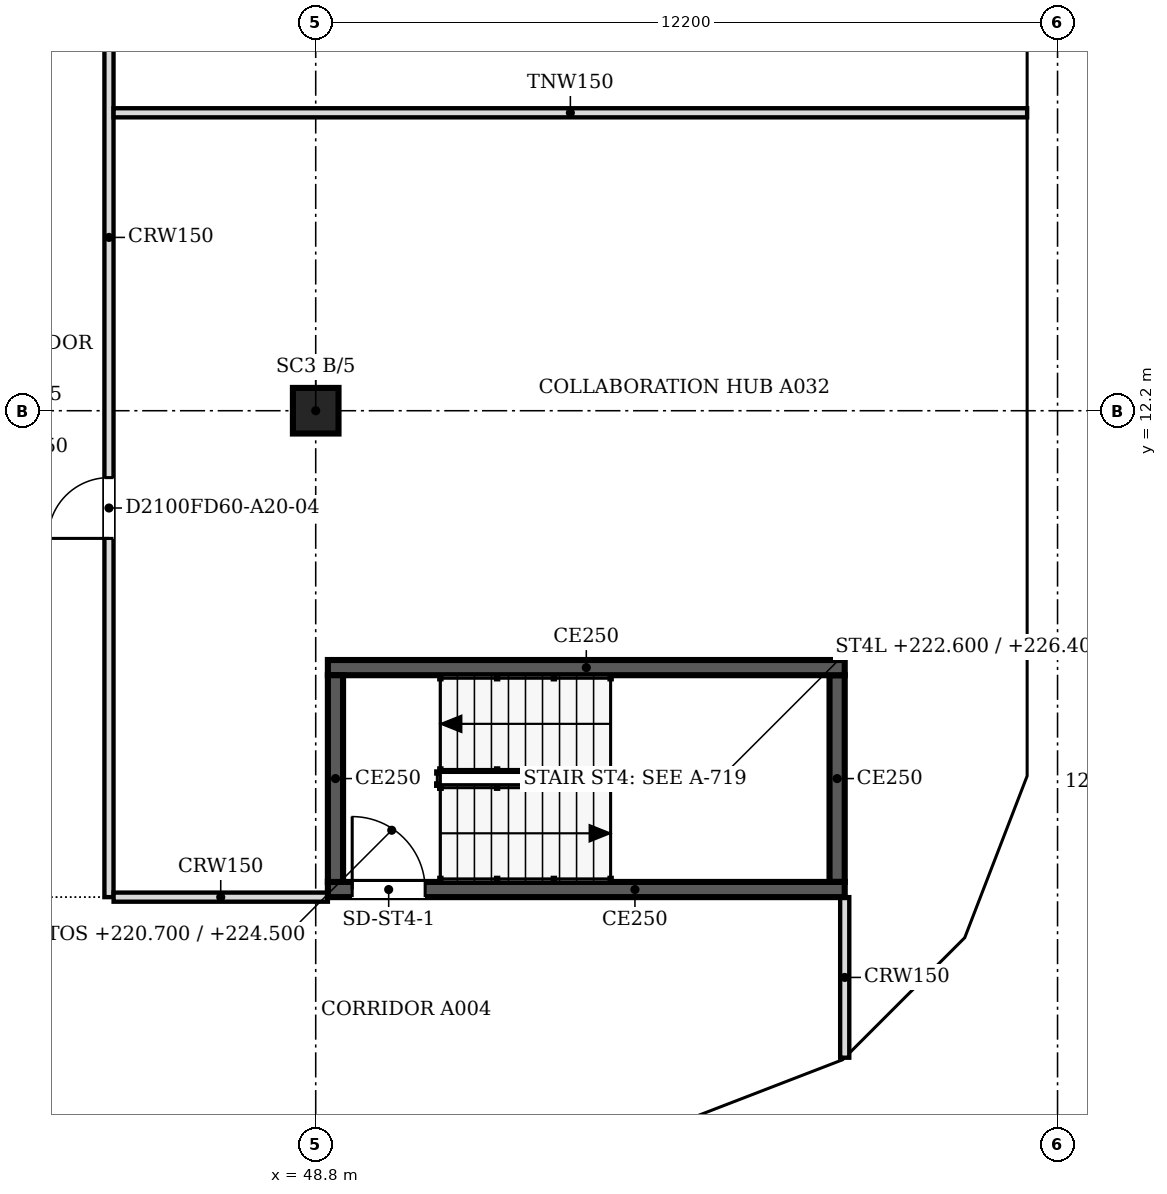
"""IFC4 building model, lengths in metres.
Left out: names, types, materials, properties, quantities, classifications, styles, units other than length and angle.
Written with IfcOpenShell. Run it as: python <this file> out.ifc"""

import sys

from ifc_helpers import new_model, si_unit, direction, frame, frame_2d, origin, origin_2d, place, context, subcontext, project, spatial, polyline, rectangle, outline, extrude, faceted_brep, source, transform, mapped, element, fill, save


model = new_model("IFC4")
c1 = context("Model", 3, precision=1e-05, world=origin(), true_north=direction((0.0, 1.0)))
c2 = subcontext(c1, "Body", "Model", "MODEL_VIEW")
j1 = project(units=[si_unit("LENGTHUNIT", "METRE"), si_unit("PLANEANGLEUNIT", "RADIAN")], contexts=[c1])
p1 = place(None, origin())
s1 = spatial("IfcSite", under=j1, at=p1, CompositionType="ELEMENT")
p2 = place(p1, origin())
s2 = spatial("IfcBuilding", under=s1, at=p2, CompositionType="ELEMENT")
p3 = place(p2, frame((0.0, 0.0, 220.7)))
s3 = spatial("IfcBuildingStorey", under=s2, at=p3, CompositionType="ELEMENT", Elevation=220.7)
p4 = place(p3, frame((48.8, 12.2, 0.0), z_axis=(0.0, 0.0, 1.0), x_axis=(1.0, 0.0, 0.0)))
e1 = element("IfcColumn", 1, at=p4, inside=s3, PredefinedType="COLUMN", context=c2, shape_type="SweptSolid", body=[
    extrude(rectangle(XDim=0.75, YDim=0.75, at=origin_2d()), origin(), (0.0, 0.0, 1.0), 3.6),
])
m1 = source(origin(), c2, "Body", "Brep", [
    faceted_brep([(0.047, -0.25, 0.0), (2.997, -0.25, 3.8), (0.047, -0.25, 7.6), (0.0, -0.25, 7.541), (0.0, -0.25, 0.059), (0.093, 0.25, 7.54), (2.944, 0.25, 3.868), (2.944, 0.25, 3.732), (0.093, 0.25, 0.06), (2.997, 0.0, 3.8), (0.047, 0.0, 0.0), (0.047, 0.0, 7.6)], [[[0, 1, 2, 3, 4]], [[5, 6, 7, 8]], [[8, 7, 9, 1, 0, 10]], [[6, 5, 11, 2, 1, 9]], [[3, 2, 11]], [[10, 0, 4]], [[8, 10, 4, 3, 11, 5]], [[9, 7, 6]]]),
])
p5 = place(p3, frame((54.81, 0.233, -3.8), z_axis=(0.0, 0.0, 1.0), x_axis=(0.932990326376, 0.359901446078, 0.0)))
e2 = element("IfcWall", 2, at=p5, inside=s3, PredefinedType="SOLIDWALL", context=c2, shape_type="MappedRepresentation", body=[
    mapped(m1, transform((0.0, 0.0, 0.0), scale=1.0)),
])
m2 = source(origin(), c2, "Body", "SweptSolid", [
    extrude(outline(polyline([(0.247, 0.665), (2.681, 3.8), (0.247, 6.935), (0.247, 0.665)])), frame((0.0, 0.26, 0.0), z_axis=(0.0, -1.0, 0.0), x_axis=(1.0, 0.0, 0.0)), (0.0, 0.0, 1.0), 0.52),
])
p6 = place(p5, origin())
e3 = element("IfcOpeningElement", 3, at=p6, cuts=e2, PredefinedType="OPENING", context=c2, shape_type="MappedRepresentation", body=[
    mapped(m2, transform((0.0, 0.0, 0.0), scale=1.0)),
])
m3 = source(origin(), c2, "Body", "Brep", [
    faceted_brep([(2.944, -0.25, 0.0), (2.997, -0.25, 0.068), (2.997, -0.25, 7.532), (2.944, -0.25, 7.6), (0.0, -0.25, 3.8), (0.053, 0.25, 3.868), (2.891, 0.25, 7.532), (2.891, 0.25, 0.068), (0.053, 0.25, 3.732), (2.944, 0.0, 0.0), (2.944, 0.0, 7.6), (0.0, 0.0, 3.8)], [[[0, 1, 2, 3, 4]], [[5, 6, 7, 8]], [[1, 0, 9]], [[10, 3, 2]], [[6, 5, 11, 4, 3, 10]], [[8, 7, 9, 0, 4, 11]], [[8, 11, 5]], [[1, 9, 7, 6, 10, 2]]]),
])
p7 = place(p3, frame((57.606, 1.312, -3.8), z_axis=(0.0, 0.0, 1.0), x_axis=(0.707147509625, 0.707066050402, 0.0)))
e4 = element("IfcWall", 4, at=p7, inside=s3, PredefinedType="SOLIDWALL", context=c2, shape_type="MappedRepresentation", body=[
    mapped(m3, transform((0.0, 0.0, 0.0), scale=1.0)),
])
m4 = source(origin(), c2, "Body", "SweptSolid", [
    extrude(outline(polyline([(2.744, 6.934), (0.316, 3.8), (2.744, 0.667), (2.744, 6.934)])), frame((0.0, 0.26, 0.0), z_axis=(0.0, -1.0, 0.0), x_axis=(1.0, 0.0, 0.0)), (0.0, 0.0, 1.0), 0.52),
])
p8 = place(p7, origin())
e5 = element("IfcOpeningElement", 5, at=p8, cuts=e4, PredefinedType="OPENING", context=c2, shape_type="MappedRepresentation", body=[
    mapped(m4, transform((0.0, 0.0, 0.0), scale=1.0)),
])
m5 = source(origin(), c2, "Body", "Brep", [
    faceted_brep([(0.053, -0.25, 0.0), (3.003, -0.25, 3.8), (0.053, -0.25, 7.6), (0.0, -0.25, 7.532), (0.0, -0.25, 0.068), (0.106, 0.25, 7.532), (2.957, 0.25, 3.86), (2.957, 0.25, 3.74), (0.106, 0.25, 0.068), (3.003, 0.0, 3.8), (0.053, 0.0, 0.0), (0.053, 0.0, 7.6)], [[[0, 1, 2, 3, 4]], [[5, 6, 7, 8]], [[8, 7, 9, 1, 0, 10]], [[6, 5, 11, 2, 1, 9]], [[3, 2, 11]], [[10, 0, 4]], [[8, 10, 4, 3, 11, 5]], [[9, 7, 6]]]),
])
p9 = place(p3, frame((59.669, 3.344, -3.8), z_axis=(0.0, 0.0, 1.0), x_axis=(0.35992665181, 0.932980602862, 0.0)))
e6 = element("IfcWall", 6, at=p9, inside=s3, PredefinedType="SOLIDWALL", context=c2, shape_type="MappedRepresentation", body=[
    mapped(m5, transform((0.0, 0.0, 0.0), scale=1.0)),
])
m6 = source(origin(), c2, "Body", "SweptSolid", [
    extrude(outline(polyline([(0.253, 0.665), (2.687, 3.8), (0.253, 6.935), (0.253, 0.665)])), frame((0.0, 0.26, 0.0), z_axis=(0.0, -1.0, 0.0), x_axis=(1.0, 0.0, 0.0)), (0.0, 0.0, 1.0), 0.52),
])
p10 = place(p9, origin())
e7 = element("IfcOpeningElement", 7, at=p10, cuts=e6, PredefinedType="OPENING", context=c2, shape_type="MappedRepresentation", body=[
    mapped(m6, transform((0.0, 0.0, 0.0), scale=1.0)),
])
m7 = source(origin(), c2, "Body", "Brep", [
    faceted_brep([(3.003, -0.25, 0.0), (6.053, -0.25, 3.8), (3.003, -0.25, 7.6), (0.0, -0.25, 3.8), (0.047, 0.25, 3.859), (3.003, 0.25, 7.6), (6.053, 0.25, 3.8), (3.003, 0.25, 0.0), (0.047, 0.25, 3.741), (0.0, 0.0, 3.8)], [[[0, 1, 2, 3]], [[4, 5, 6, 7, 8]], [[7, 6, 1, 0]], [[6, 5, 2, 1]], [[5, 4, 9, 3, 2]], [[8, 7, 0, 3, 9]], [[8, 9, 4]]]),
])
p11 = place(p3, frame((60.75, 6.146, -3.8), z_axis=(0.0, 0.0, 1.0), x_axis=(0.0, 1.0, 0.0)))
e8 = element("IfcWall", 8, at=p11, inside=s3, PredefinedType="SOLIDWALL", context=c2, shape_type="MappedRepresentation", body=[
    mapped(m7, transform((0.0, 0.0, 0.0), scale=1.0)),
])
m8 = source(origin(), c2, "Body", "SweptSolid", [
    extrude(outline(polyline([(3.005, 0.401), (5.733, 3.8), (3.005, 7.199), (0.319, 3.8), (3.005, 0.401)])), frame((0.0, 0.26, 0.0), z_axis=(0.0, -1.0, 0.0), x_axis=(1.0, 0.0, 0.0)), (0.0, 0.0, 1.0), 0.52),
])
p12 = place(p11, origin())
e9 = element("IfcOpeningElement", 9, at=p12, cuts=e8, PredefinedType="OPENING", context=c2, shape_type="MappedRepresentation", body=[
    mapped(m8, transform((0.0, 0.0, 0.0), scale=1.0)),
])
m9 = source(origin(), c2, "Body", "SweptSolid", [
    extrude(outline(polyline([(3.05, 0.0), (6.1, 3.8), (3.05, 7.6), (0.0, 3.8), (3.05, 0.0)])), frame((0.0, 0.25, 0.0), z_axis=(0.0, -1.0, 0.0), x_axis=(1.0, 0.0, 0.0)), (0.0, 0.0, 1.0), 0.5),
])
p13 = place(p3, frame((60.75, 12.2, -3.8), z_axis=(0.0, 0.0, 1.0), x_axis=(0.0, 1.0, 0.0)))
e10 = element("IfcWall", 10, at=p13, inside=s3, PredefinedType="SOLIDWALL", context=c2, shape_type="MappedRepresentation", body=[
    mapped(m9, transform((0.0, 0.0, 0.0), scale=1.0)),
])
m10 = source(origin(), c2, "Body", "SweptSolid", [
    extrude(outline(polyline([(3.05, 0.399), (5.78, 3.8), (3.05, 7.201), (0.321, 3.8), (3.05, 0.399)])), frame((0.0, 0.26, 0.0), z_axis=(0.0, -1.0, 0.0), x_axis=(1.0, 0.0, 0.0)), (0.0, 0.0, 1.0), 0.52),
])
p14 = place(p13, origin())
e11 = element("IfcOpeningElement", 11, at=p14, cuts=e10, PredefinedType="OPENING", context=c2, shape_type="MappedRepresentation", body=[
    mapped(m10, transform((0.0, 0.0, 0.0), scale=1.0)),
])
p15 = place(p2, frame((0.0, 0.0, 224.5)))
s4 = spatial("IfcBuildingStorey", under=s2, at=p15, CompositionType="ELEMENT", Elevation=224.5)
m11 = source(origin(), c2, "Body", "Brep", [
    faceted_brep([(2.95, -0.25, 0.0), (3.003, -0.25, 0.068), (3.003, -0.25, 7.532), (2.95, -0.25, 7.6), (0.0, -0.25, 3.8), (0.047, 0.25, 3.86), (2.898, 0.25, 7.532), (2.898, 0.25, 0.068), (0.047, 0.25, 3.74), (2.95, 0.0, 0.0), (2.95, 0.0, 7.6), (0.0, 0.0, 3.8)], [[[0, 1, 2, 3, 4]], [[5, 6, 7, 8]], [[1, 0, 9]], [[10, 3, 2]], [[6, 5, 11, 4, 3, 10]], [[8, 7, 9, 0, 4, 11]], [[8, 11, 5]], [[1, 9, 7, 6, 10, 2]]]),
])
p16 = place(p15, frame((54.854, 0.25, -3.8), z_axis=(0.0, 0.0, 1.0), x_axis=(0.932970071518, 0.359953949349, 0.0)))
e12 = element("IfcWall", 12, at=p16, inside=s4, PredefinedType="SOLIDWALL", context=c2, shape_type="MappedRepresentation", body=[
    mapped(m11, transform((0.0, 0.0, 0.0), scale=1.0)),
])
m12 = source(origin(), c2, "Body", "SweptSolid", [
    extrude(outline(polyline([(2.75, 6.935), (0.316, 3.8), (2.75, 0.665), (2.75, 6.935)])), frame((0.0, 0.26, 0.0), z_axis=(0.0, -1.0, 0.0), x_axis=(1.0, 0.0, 0.0)), (0.0, 0.0, 1.0), 0.52),
])
p17 = place(p16, origin())
e13 = element("IfcOpeningElement", 13, at=p17, cuts=e12, PredefinedType="OPENING", context=c2, shape_type="MappedRepresentation", body=[
    mapped(m12, transform((0.0, 0.0, 0.0), scale=1.0)),
])
m13 = source(origin(), c2, "Body", "Brep", [
    faceted_brep([(0.053, -0.25, 0.0), (2.997, -0.25, 3.8), (0.053, -0.25, 7.6), (0.0, -0.25, 7.532), (0.0, -0.25, 0.068), (0.106, 0.25, 7.532), (2.944, 0.25, 3.868), (2.944, 0.25, 3.732), (0.106, 0.25, 0.068), (2.997, 0.0, 3.8), (0.053, 0.0, 0.0), (0.053, 0.0, 7.6)], [[[0, 1, 2, 3, 4]], [[5, 6, 7, 8]], [[8, 7, 9, 1, 0, 10]], [[6, 5, 11, 2, 1, 9]], [[3, 2, 11]], [[10, 0, 4]], [[8, 10, 4, 3, 11, 5]], [[9, 7, 6]]]),
])
p18 = place(p15, frame((57.569, 1.274, -3.8), z_axis=(0.0, 0.0, 1.0), x_axis=(0.707066050402, 0.707147509625, 0.0)))
e14 = element("IfcWall", 14, at=p18, inside=s4, PredefinedType="SOLIDWALL", context=c2, shape_type="MappedRepresentation", body=[
    mapped(m13, transform((0.0, 0.0, 0.0), scale=1.0)),
])
m14 = source(origin(), c2, "Body", "SweptSolid", [
    extrude(outline(polyline([(0.253, 0.666), (2.681, 3.8), (0.253, 6.934), (0.253, 0.666)])), frame((0.0, 0.26, 0.0), z_axis=(0.0, -1.0, 0.0), x_axis=(1.0, 0.0, 0.0)), (0.0, 0.0, 1.0), 0.52),
])
p19 = place(p18, origin())
e15 = element("IfcOpeningElement", 15, at=p19, cuts=e14, PredefinedType="OPENING", context=c2, shape_type="MappedRepresentation", body=[
    mapped(m14, transform((0.0, 0.0, 0.0), scale=1.0)),
])
m15 = source(origin(), c2, "Body", "Brep", [
    faceted_brep([(2.95, -0.25, 0.0), (2.997, -0.25, 0.059), (2.997, -0.25, 7.541), (2.95, -0.25, 7.6), (0.0, -0.25, 3.8), (0.053, 0.25, 3.868), (2.904, 0.25, 7.54), (2.904, 0.25, 0.06), (0.053, 0.25, 3.732), (2.95, 0.0, 0.0), (2.95, 0.0, 7.6), (0.0, 0.0, 3.8)], [[[0, 1, 2, 3, 4]], [[5, 6, 7, 8]], [[1, 0, 9]], [[10, 3, 2]], [[6, 5, 11, 4, 3, 10]], [[8, 7, 9, 0, 4, 11]], [[8, 11, 5]], [[1, 9, 7, 6, 10, 2]]]),
])
p20 = place(p15, frame((59.688, 3.394, -3.8), z_axis=(0.0, 0.0, 1.0), x_axis=(0.359972353723, 0.932962970624, 0.0)))
e16 = element("IfcWall", 16, at=p20, inside=s4, PredefinedType="SOLIDWALL", context=c2, shape_type="MappedRepresentation", body=[
    mapped(m15, transform((0.0, 0.0, 0.0), scale=1.0)),
])
p21 = place(p20, origin())
e17 = element("IfcOpeningElement", 17, at=p21, cuts=e16, PredefinedType="OPENING", context=c2, shape_type="MappedRepresentation", body=[
    mapped(m12, transform((0.0, 0.0, 0.0), scale=1.0)),
])
m16 = source(origin(), c2, "Body", "Brep", [
    faceted_brep([(0.047, -0.25, 0.0), (3.05, -0.25, 3.8), (0.047, -0.25, 7.6), (0.0, -0.25, 7.54), (0.0, -0.25, 0.06), (0.093, 0.25, 7.541), (3.05, 0.25, 3.8), (0.093, 0.25, 0.059), (0.047, 0.0, 0.0), (0.047, 0.0, 7.6)], [[[0, 1, 2, 3, 4]], [[5, 6, 7]], [[7, 6, 1, 0, 8]], [[6, 5, 9, 2, 1]], [[3, 2, 9]], [[8, 0, 4]], [[7, 8, 4, 3, 9, 5]]]),
])
p22 = place(p15, frame((60.75, 6.1, -3.8), z_axis=(0.0, 0.0, 1.0), x_axis=(0.0, 1.0, 0.0)))
e18 = element("IfcWall", 18, at=p22, inside=s4, PredefinedType="SOLIDWALL", context=c2, shape_type="MappedRepresentation", body=[
    mapped(m16, transform((0.0, 0.0, 0.0), scale=1.0)),
])
m17 = source(origin(), c2, "Body", "SweptSolid", [
    extrude(outline(polyline([(0.247, 0.656), (2.731, 3.8), (0.247, 6.944), (0.247, 0.656)])), frame((0.0, 0.26, 0.0), z_axis=(0.0, -1.0, 0.0), x_axis=(1.0, 0.0, 0.0)), (0.0, 0.0, 1.0), 0.52),
])
p23 = place(p22, origin())
e19 = element("IfcOpeningElement", 19, at=p23, cuts=e18, PredefinedType="OPENING", context=c2, shape_type="MappedRepresentation", body=[
    mapped(m17, transform((0.0, 0.0, 0.0), scale=1.0)),
])
p24 = place(p15, frame((60.75, 9.15, -3.8), z_axis=(0.0, 0.0, 1.0), x_axis=(0.0, 1.0, 0.0)))
e20 = element("IfcWall", 20, at=p24, inside=s4, PredefinedType="SOLIDWALL", context=c2, shape_type="MappedRepresentation", body=[
    mapped(m9, transform((0.0, 0.0, 0.0), scale=1.0)),
])
p25 = place(p24, origin())
e21 = element("IfcOpeningElement", 21, at=p25, cuts=e20, PredefinedType="OPENING", context=c2, shape_type="MappedRepresentation", body=[
    mapped(m10, transform((0.0, 0.0, 0.0), scale=1.0)),
])
p26 = place(p15, frame((60.75, 15.25, -3.8), z_axis=(0.0, 0.0, 1.0), x_axis=(0.0, 1.0, 0.0)))
e22 = element("IfcWall", 22, at=p26, inside=s4, PredefinedType="SOLIDWALL", context=c2, shape_type="MappedRepresentation", body=[
    mapped(m9, transform((0.0, 0.0, 0.0), scale=1.0)),
])
p27 = place(p26, origin())
e23 = element("IfcOpeningElement", 23, at=p27, cuts=e22, PredefinedType="OPENING", context=c2, shape_type="MappedRepresentation", body=[
    mapped(m10, transform((0.0, 0.0, 0.0), scale=1.0)),
])
p28 = place(p3, frame((57.5, 4.325, 0.0), z_axis=(0.0, 0.0, 1.0), x_axis=(-1.0, 0.0, 0.0)))
e24 = element("IfcWall", 24, at=p28, inside=s3, PredefinedType="SOLIDWALL", context=c2, shape_type="SweptSolid", body=[
    extrude(rectangle(XDim=8.5, YDim=0.25, at=frame_2d((4.25, 0.0))), origin(), (0.0, 0.0, 1.0), 3.8),
])
m18 = source(origin(), c2, "Body", "SweptSolid", [
    extrude(rectangle(XDim=1.2, YDim=2.1, at=frame_2d((0.6, 1.05))), frame((0.0, 0.135, 0.0), z_axis=(0.0, -1.0, 0.0), x_axis=(1.0, 0.0, 0.0)), (0.0, 0.0, 1.0), 0.27),
])
p29 = place(p28, frame((6.9, 0.0, 0.0)))
e25 = element("IfcOpeningElement", 25, at=p29, cuts=e24, PredefinedType="OPENING", context=c2, shape_type="MappedRepresentation", body=[
    mapped(m18, transform((0.0, 0.0, 0.0), scale=1.0)),
])
p30 = place(p3, frame((49.125, 4.45, 0.0), z_axis=(0.0, 0.0, 1.0), x_axis=(0.0, 1.0, 0.0)))
e26 = element("IfcWall", 26, at=p30, inside=s3, PredefinedType="SOLIDWALL", context=c2, shape_type="SweptSolid", body=[
    extrude(rectangle(XDim=3.4, YDim=0.25, at=frame_2d((1.7, 0.0))), origin(), (0.0, 0.0, 1.0), 3.8),
])
p31 = place(p3, frame((49.0, 7.975, 0.0), z_axis=(0.0, 0.0, 1.0), x_axis=(1.0, 0.0, 0.0)))
e27 = element("IfcWall", 27, at=p31, inside=s3, PredefinedType="SOLIDWALL", context=c2, shape_type="SweptSolid", body=[
    extrude(rectangle(XDim=8.5, YDim=0.25, at=frame_2d((4.25, 0.0))), origin(), (0.0, 0.0, 1.0), 3.8),
])
p32 = place(p3, frame((57.375, 7.85, 0.0), z_axis=(0.0, 0.0, 1.0), x_axis=(0.0, -1.0, 0.0)))
e28 = element("IfcWall", 28, at=p32, inside=s3, PredefinedType="SOLIDWALL", context=c2, shape_type="SweptSolid", body=[
    extrude(rectangle(XDim=3.4, YDim=0.25, at=frame_2d((1.7, 0.0))), origin(), (0.0, 0.0, 1.0), 3.8),
])
p33 = place(p3, frame((57.5, 1.559, 0.0), z_axis=(0.0, 0.0, 1.0), x_axis=(0.0, 1.0, 0.0)))
e29 = element("IfcWall", 29, at=p33, inside=s3, PredefinedType="PARTITIONING", context=c2, shape_type="SweptSolid", body=[
    extrude(rectangle(XDim=2.641, YDim=0.15, at=frame_2d((1.32, 0.0))), origin(), (0.0, 0.0, 1.0), 3.067),
])
p34 = place(p3, frame((45.4, 21.924, 0.0), z_axis=(0.0, 0.0, 1.0), x_axis=(0.0, -1.0, 0.0)))
e30 = element("IfcWall", 30, at=p34, inside=s3, PredefinedType="PARTITIONING", context=c2, shape_type="SweptSolid", body=[
    extrude(rectangle(XDim=17.724, YDim=0.15, at=frame_2d((8.862, 0.0))), origin(), (0.0, 0.0, 1.0), 3.067),
])
m19 = source(origin(), c2, "Body", "SweptSolid", [
    extrude(rectangle(XDim=1.0, YDim=2.1, at=frame_2d((0.5, 1.05))), frame((0.0, 0.085, 0.0), z_axis=(0.0, -1.0, 0.0), x_axis=(1.0, 0.0, 0.0)), (0.0, 0.0, 1.0), 0.17),
])
p35 = place(p34, frame((1.923, 0.0, 0.0)))
e31 = element("IfcOpeningElement", 31, at=p35, cuts=e30, PredefinedType="OPENING", context=c2, shape_type="MappedRepresentation", body=[
    mapped(m19, transform((0.0, 0.0, 0.0), scale=1.0)),
])
p36 = place(p34, frame((10.824, 0.0, 0.0)))
e32 = element("IfcOpeningElement", 32, at=p36, cuts=e30, PredefinedType="OPENING", context=c2, shape_type="MappedRepresentation", body=[
    mapped(m19, transform((0.0, 0.0, 0.0), scale=1.0)),
])
p37 = place(p3, frame((45.476, 4.2, 0.0), z_axis=(0.0, 0.0, 1.0), x_axis=(1.0, 0.0, 0.0)))
e33 = element("IfcWall", 33, at=p37, inside=s3, PredefinedType="PARTITIONING", context=c2, shape_type="SweptSolid", body=[
    extrude(rectangle(XDim=3.524, YDim=0.15, at=frame_2d((1.762, 0.0))), origin(), (0.0, 0.0, 1.0), 3.067),
])
p38 = place(p3, frame((45.476, 17.1, 0.0), z_axis=(0.0, 0.0, 1.0), x_axis=(1.0, 0.0, 0.0)))
e34 = element("IfcWall", 34, at=p38, inside=s3, PredefinedType="PARTITIONING", context=c2, shape_type="SweptSolid", body=[
    extrude(rectangle(XDim=15.024, YDim=0.15, at=frame_2d((7.512, 0.0))), origin(), (0.0, 0.0, 1.0), 3.067),
])
m20 = source(origin(), c2, "Body", "SweptSolid", [
    extrude(rectangle(XDim=1.2, YDim=2.1, at=frame_2d((0.6, 1.05))), frame((0.0, 0.025, 0.0), z_axis=(0.0, -1.0, 0.0), x_axis=(1.0, 0.0, 0.0)), (0.0, 0.0, 1.0), 0.05),
])
p39 = place(p29, origin())
e35 = element("IfcDoor", 35, at=p39, inside=s3, OperationType="SINGLE_SWING_RIGHT", PredefinedType="DOOR", context=c2, shape_type="MappedRepresentation", body=[
    mapped(m20, transform((0.0, 0.0, 0.0), scale=1.0)),
])
fill(e25, e35)
m21 = source(origin(), c2, "Body", "SweptSolid", [
    extrude(rectangle(XDim=1.0, YDim=2.1, at=frame_2d((0.5, 1.05))), frame((0.0, 0.025, 0.0), z_axis=(0.0, -1.0, 0.0), x_axis=(1.0, 0.0, 0.0)), (0.0, 0.0, 1.0), 0.05),
])
p40 = place(p36, origin())
e36 = element("IfcDoor", 36, at=p40, inside=s3, OperationType="SINGLE_SWING_RIGHT", PredefinedType="DOOR", context=c2, shape_type="MappedRepresentation", body=[
    mapped(m21, transform((0.0, 0.0, 0.0), scale=1.0)),
])
fill(e32, e36)
save(model, sys.argv[1])
